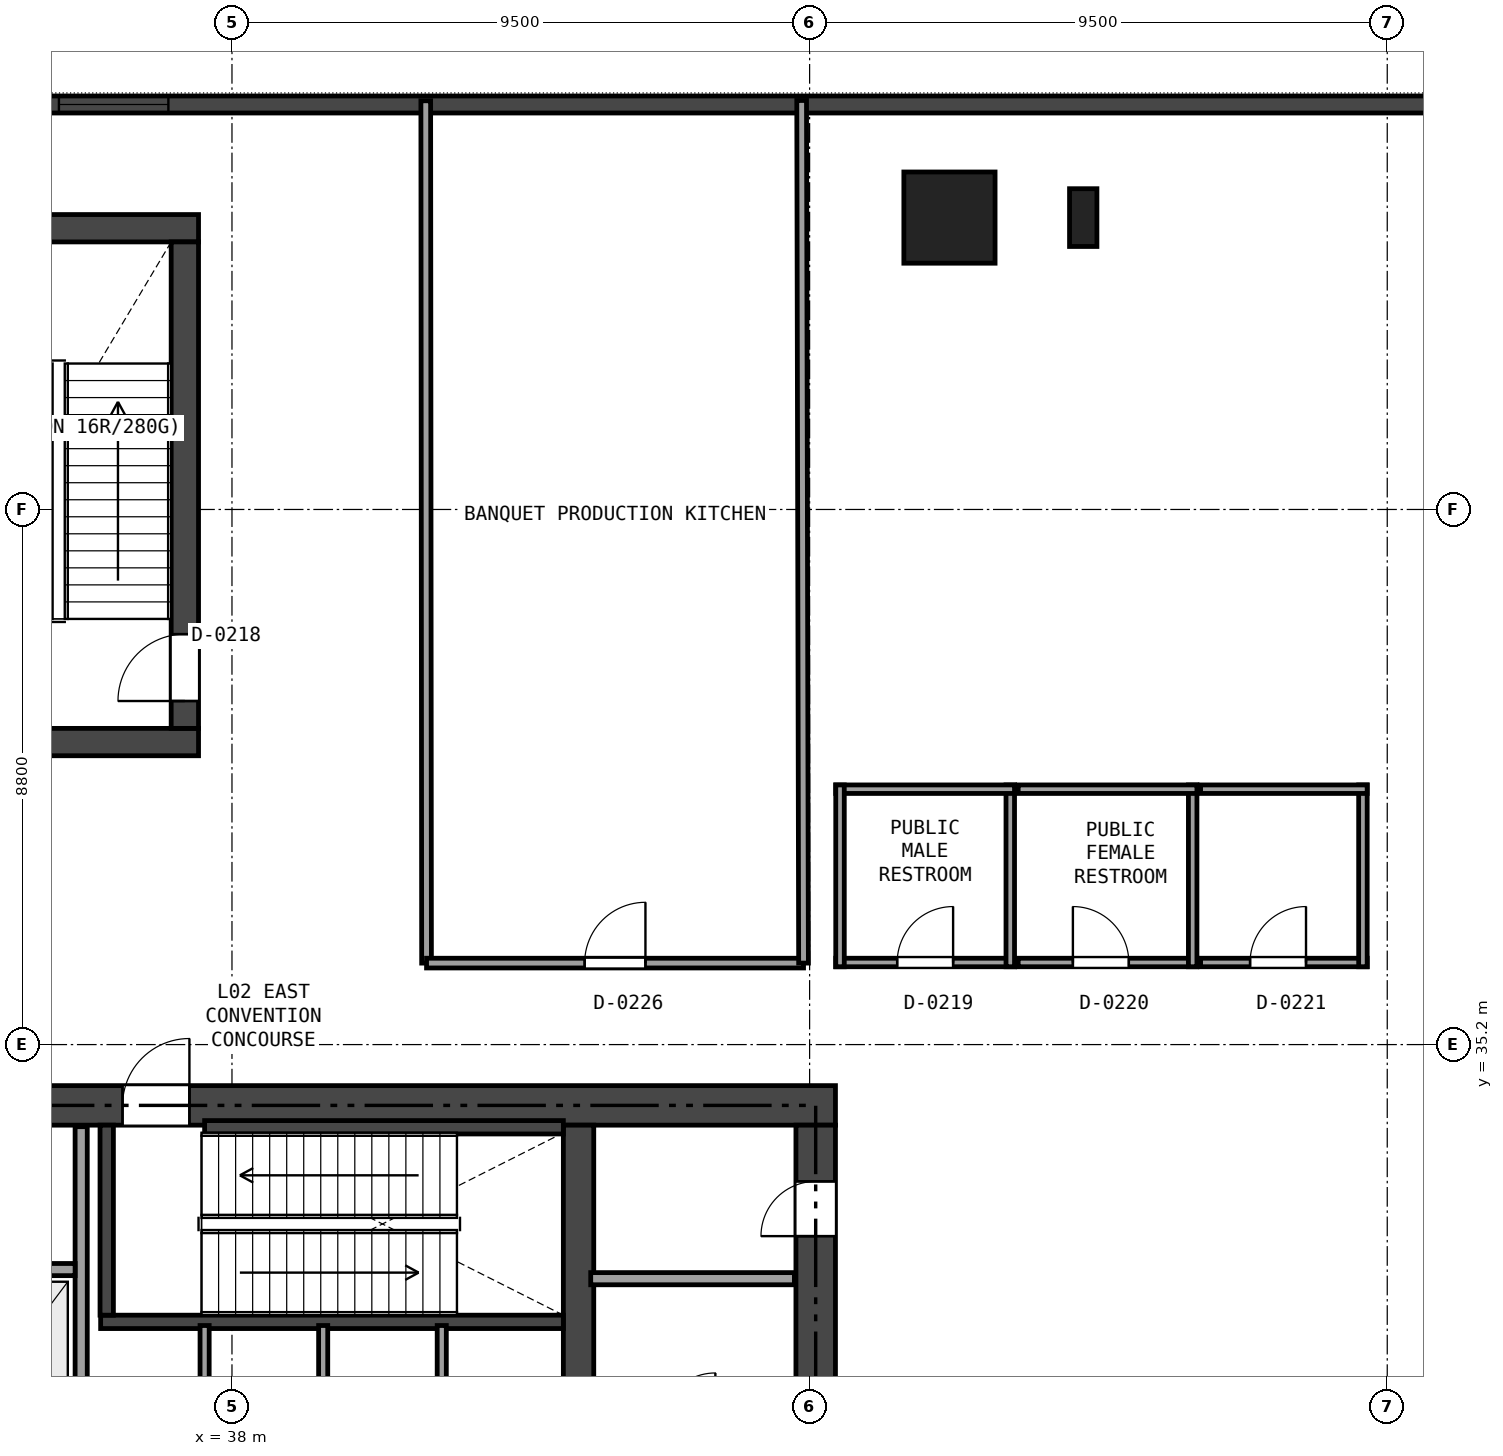
"""IFC4 building model, lengths in metres.
Left out: names, types, materials, properties, quantities, classifications, styles, units other than length and angle.
Written with IfcOpenShell. Run it as: python <this file> out.ifc"""

import sys

from ifc_helpers import new_model, si_unit, direction, frame, frame_2d, origin, origin_2d, place, context, subcontext, project, spatial, rectangle, extrude, element, fill, save


model = new_model("IFC4")
c1 = context("Model", 3, precision=1e-05, world=origin(), true_north=direction((0.0, 1.0)))
c2 = subcontext(c1, "Body", "Model", "MODEL_VIEW")
j1 = project(units=[si_unit("LENGTHUNIT", "METRE"), si_unit("PLANEANGLEUNIT", "RADIAN")], contexts=[c1])
p1 = place(None, origin())
s1 = spatial("IfcSite", under=j1, at=p1, CompositionType="ELEMENT")
p2 = place(p1, origin())
s2 = spatial("IfcBuilding", under=s1, at=p2, CompositionType="ELEMENT")
p3 = place(p2, frame((0.0, 0.0, 10.8)))
s3 = spatial("IfcBuildingStorey", under=s2, at=p3, CompositionType="ELEMENT", Elevation=10.8)
p4 = place(p3, frame((26.475, 34.2, 0.0), z_axis=(0.0, 0.0, 1.0), x_axis=(1.0, 0.0, 0.0)))
e1 = element("IfcWall", 1, at=p4, inside=s3, PredefinedType="SHEAR", context=c2, shape_type="SweptSolid", body=[
    extrude(rectangle(XDim=21.45, YDim=0.65, at=frame_2d((10.725, 0.0))), origin(), (0.0, 0.0, 1.0), 5.05),
])
p5 = place(p4, frame((9.725, 0.0, 0.0)))
e2 = element("IfcOpeningElement", 2, at=p5, cuts=e1, PredefinedType="OPENING", context=c2, shape_type="SweptSolid", body=[
    extrude(rectangle(XDim=1.1, YDim=2.15, at=frame_2d((0.55, 1.075))), frame((0.0, 0.335, 0.0), z_axis=(0.0, -1.0, 0.0), x_axis=(1.0, 0.0, 0.0)), (0.0, 0.0, 1.0), 0.67),
])
p6 = place(p4, frame((1.975, 0.0, 0.0)))
e3 = element("IfcOpeningElement", 3, at=p6, cuts=e1, PredefinedType="OPENING", context=c2, shape_type="SweptSolid", body=[
    extrude(rectangle(XDim=0.9, YDim=2.1, at=frame_2d((0.45, 1.05))), frame((0.0, 0.335, 0.0), z_axis=(0.0, -1.0, 0.0), x_axis=(1.0, 0.0, 0.0)), (0.0, 0.0, 1.0), 0.67),
])
p7 = place(p4, frame((6.275, 0.0, 0.0)))
e4 = element("IfcOpeningElement", 4, at=p7, cuts=e1, PredefinedType="OPENING", context=c2, shape_type="SweptSolid", body=[
    extrude(rectangle(XDim=0.9, YDim=2.1, at=frame_2d((0.45, 1.05))), frame((0.0, 0.335, 0.0), z_axis=(0.0, -1.0, 0.0), x_axis=(1.0, 0.0, 0.0)), (0.0, 0.0, 1.0), 0.67),
])
p8 = place(p3, frame((47.6, 18.925, 0.0), z_axis=(0.0, 0.0, 1.0), x_axis=(0.0, 1.0, 0.0)))
e5 = element("IfcWall", 5, at=p8, inside=s3, PredefinedType="SHEAR", context=c2, shape_type="SweptSolid", body=[
    extrude(rectangle(XDim=14.95, YDim=0.65, at=frame_2d((7.475, 0.0))), origin(), (0.0, 0.0, 1.0), 5.05),
])
p9 = place(p8, frame((6.575, 0.0, 0.0)))
e6 = element("IfcOpeningElement", 6, at=p9, cuts=e5, PredefinedType="OPENING", context=c2, shape_type="SweptSolid", body=[
    extrude(rectangle(XDim=1.1, YDim=2.15, at=frame_2d((0.55, 1.075))), frame((0.0, 0.335, 0.0), z_axis=(0.0, -1.0, 0.0), x_axis=(1.0, 0.0, 0.0)), (0.0, 0.0, 1.0), 0.67),
])
p10 = place(p8, frame((8.475, 0.0, 0.0)))
e7 = element("IfcOpeningElement", 7, at=p10, cuts=e5, PredefinedType="OPENING", context=c2, shape_type="SweptSolid", body=[
    extrude(rectangle(XDim=0.9, YDim=2.1, at=frame_2d((0.45, 1.05))), frame((0.0, 0.335, 0.0), z_axis=(0.0, -1.0, 0.0), x_axis=(1.0, 0.0, 0.0)), (0.0, 0.0, 1.0), 0.67),
])
p11 = place(p8, frame((13.125, 0.0, 0.0)))
e8 = element("IfcOpeningElement", 8, at=p11, cuts=e5, PredefinedType="OPENING", context=c2, shape_type="SweptSolid", body=[
    extrude(rectangle(XDim=0.9, YDim=2.1, at=frame_2d((0.45, 1.05))), frame((0.0, 0.335, 0.0), z_axis=(0.0, -1.0, 0.0), x_axis=(1.0, 0.0, 0.0)), (0.0, 0.0, 1.0), 0.67),
])
p12 = place(p3, frame((43.7, 18.925, 0.0), z_axis=(0.0, 0.0, 1.0), x_axis=(0.0, 1.0, 0.0)))
e9 = element("IfcWall", 9, at=p12, inside=s3, PredefinedType="SHEAR", context=c2, shape_type="SweptSolid", body=[
    extrude(rectangle(XDim=14.95, YDim=0.5, at=frame_2d((7.475, 0.0))), origin(), (0.0, 0.0, 1.0), 5.05),
])
p13 = place(p12, frame((8.075, 0.0, 0.0)))
e10 = element("IfcOpeningElement", 10, at=p13, cuts=e9, PredefinedType="OPENING", context=c2, shape_type="SweptSolid", body=[
    extrude(rectangle(XDim=0.9, YDim=2.1, at=frame_2d((0.45, 1.05))), frame((0.0, 0.26, 0.0), z_axis=(0.0, -1.0, 0.0), x_axis=(1.0, 0.0, 0.0)), (0.0, 0.0, 1.0), 0.52),
])
p14 = place(p3, frame((35.84, 30.64, 0.0), z_axis=(0.0, 0.0, 1.0), x_axis=(1.0, 0.0, 0.0)))
e11 = element("IfcWall", 11, at=p14, inside=s3, PredefinedType="SHEAR", context=c2, shape_type="SweptSolid", body=[
    extrude(rectangle(XDim=7.61, YDim=0.22, at=frame_2d((3.805, 0.0))), origin(), (0.0, 0.0, 1.0), 5.05),
])
p15 = place(p3, frame((35.94, 30.75, 0.0), z_axis=(0.0, 0.0, 1.0), x_axis=(0.0, 1.0, 0.0)))
e12 = element("IfcWall", 12, at=p15, inside=s3, PredefinedType="SHEAR", context=c2, shape_type="SweptSolid", body=[
    extrude(rectangle(XDim=3.125, YDim=0.22, at=frame_2d((1.562, 0.0))), origin(), (0.0, 0.0, 1.0), 5.05),
])
p16 = place(p3, frame((37.55, 33.84, 0.0), z_axis=(0.0, 0.0, 1.0), x_axis=(1.0, 0.0, 0.0)))
e13 = element("IfcWall", 13, at=p16, inside=s3, PredefinedType="SHEAR", context=c2, shape_type="SweptSolid", body=[
    extrude(rectangle(XDim=5.9, YDim=0.22, at=frame_2d((2.95, 0.0))), origin(), (0.0, 0.0, 1.0), 5.05),
])
for number, where, z_axis, x_axis in (
    (14, (32.85, 40.175, 0.0), (0.0, 0.0, 1.0), (1.0, 0.0, 0.0)),
    (15, (32.85, 48.625, 0.0), (0.0, 0.0, 1.0), (1.0, 0.0, 0.0)),
):
    element("IfcWall", number, at=place(p3, frame(where, z_axis=z_axis, x_axis=x_axis)), inside=s3, PredefinedType="SHEAR", context=c2, shape_type="SweptSolid", body=[
        extrude(rectangle(XDim=4.6, YDim=0.45, at=frame_2d((2.3, 0.0))), origin(), (0.0, 0.0, 1.0), 5.05),
    ])
p17 = place(p3, frame((37.225, 40.4, 0.0), z_axis=(0.0, 0.0, 1.0), x_axis=(0.0, 1.0, 0.0)))
e16 = element("IfcWall", 16, at=p17, inside=s3, PredefinedType="SHEAR", context=c2, shape_type="SweptSolid", body=[
    extrude(rectangle(XDim=8.0, YDim=0.45, at=frame_2d((4.0, 0.0))), origin(), (0.0, 0.0, 1.0), 5.05),
])
p18 = place(p17, frame((0.45, 0.0, 0.0)))
e17 = element("IfcOpeningElement", 17, at=p18, cuts=e16, PredefinedType="OPENING", context=c2, shape_type="SweptSolid", body=[
    extrude(rectangle(XDim=1.1, YDim=2.15, at=frame_2d((0.55, 1.075))), frame((0.0, 0.235, 0.0), z_axis=(0.0, -1.0, 0.0), x_axis=(1.0, 0.0, 0.0)), (0.0, 0.0, 1.0), 0.47),
])
p19 = place(p3, frame((49.8, 48.8, 0.0), z_axis=(0.0, 0.0, 1.0), x_axis=(1.0, 0.0, 0.0)))
e18 = element("IfcColumn", 18, at=p19, inside=s3, PredefinedType="COLUMN", context=c2, shape_type="SweptSolid", body=[
    extrude(rectangle(XDim=1.5, YDim=1.5, at=origin_2d()), origin(), (0.0, 0.0, 1.0), 5.05),
])
p20 = place(p3, frame((52.0, 48.8, 0.0), z_axis=(0.0, 0.0, 1.0), x_axis=(1.0, 0.0, 0.0)))
e19 = element("IfcColumn", 19, at=p20, inside=s3, PredefinedType="PILASTER", context=c2, shape_type="SweptSolid", body=[
    extrude(rectangle(XDim=0.45, YDim=0.95, at=origin_2d()), origin(), (0.0, 0.0, 1.0), 5.05),
])
p21 = place(p3, frame((3.74, 50.66, 0.0), z_axis=(0.0, 0.0, 1.0), x_axis=(1.0, 0.0, 0.0)))
e20 = element("IfcWall", 20, at=p21, inside=s3, PredefinedType="SOLIDWALL", context=c2, shape_type="SweptSolid", body=[
    extrude(rectangle(XDim=67.32, YDim=0.28, at=frame_2d((33.66, 0.0))), origin(), (0.0, 0.0, 1.0), 5.05),
])
p22 = place(p21, frame((13.91, 0.0, 0.95)))
e21 = element("IfcOpeningElement", 21, at=p22, cuts=e20, PredefinedType="OPENING", context=c2, shape_type="SweptSolid", body=[
    extrude(rectangle(XDim=1.8, YDim=2.3, at=frame_2d((0.9, 1.15))), frame((0.0, 0.15, 0.0), z_axis=(0.0, -1.0, 0.0), x_axis=(1.0, 0.0, 0.0)), (0.0, 0.0, 1.0), 0.3),
])
p23 = place(p21, frame((31.414, 0.0, 0.95)))
e22 = element("IfcOpeningElement", 22, at=p23, cuts=e20, PredefinedType="OPENING", context=c2, shape_type="SweptSolid", body=[
    extrude(rectangle(XDim=1.8, YDim=2.3, at=frame_2d((0.9, 1.15))), frame((0.0, 0.15, 0.0), z_axis=(0.0, -1.0, 0.0), x_axis=(1.0, 0.0, 0.0)), (0.0, 0.0, 1.0), 0.3),
])
p24 = place(p3, frame((43.9, 31.35, 0.0), z_axis=(0.0, 0.0, 1.0), x_axis=(1.0, 0.0, 0.0)))
e23 = element("IfcWall", 23, at=p24, inside=s3, PredefinedType="SOLIDWALL", context=c2, shape_type="SweptSolid", body=[
    extrude(rectangle(XDim=3.35, YDim=0.2, at=frame_2d((1.675, 0.0))), origin(), (0.0, 0.0, 1.0), 5.05),
])
p25 = place(p3, frame((35.52, 18.95, 0.0), z_axis=(0.0, 0.0, 1.0), x_axis=(0.0, 1.0, 0.0)))
e24 = element("IfcWall", 24, at=p25, inside=s3, PredefinedType="SOLIDWALL", context=c2, shape_type="SweptSolid", body=[
    extrude(rectangle(XDim=14.9, YDim=0.2, at=frame_2d((7.45, 0.0))), origin(), (0.0, 0.0, 1.0), 4.571),
])
p26 = place(p25, frame((7.755, 0.0, 0.0)))
e25 = element("IfcOpeningElement", 25, at=p26, cuts=e24, PredefinedType="OPENING", context=c2, shape_type="SweptSolid", body=[
    extrude(rectangle(XDim=0.95, YDim=2.15, at=frame_2d((0.475, 1.075))), frame((0.0, 0.11, 0.0), z_axis=(0.0, -1.0, 0.0), x_axis=(1.0, 0.0, 0.0)), (0.0, 0.0, 1.0), 0.22),
])
p27 = place(p25, frame((0.6, 0.0, 0.0)))
e26 = element("IfcOpeningElement", 26, at=p27, cuts=e24, PredefinedType="OPENING", context=c2, shape_type="SweptSolid", body=[
    extrude(rectangle(XDim=0.9, YDim=2.1, at=frame_2d((0.45, 1.05))), frame((0.0, 0.11, 0.0), z_axis=(0.0, -1.0, 0.0), x_axis=(1.0, 0.0, 0.0)), (0.0, 0.0, 1.0), 0.22),
])
p28 = place(p3, frame((31.0, 31.5, 0.0), z_axis=(0.0, 0.0, 1.0), x_axis=(1.0, 0.0, 0.0)))
e27 = element("IfcWall", 27, at=p28, inside=s3, PredefinedType="SOLIDWALL", context=c2, shape_type="SweptSolid", body=[
    extrude(rectangle(XDim=4.42, YDim=0.2, at=frame_2d((2.21, 0.0))), origin(), (0.0, 0.0, 1.0), 5.05),
])
for number, where, z_axis, x_axis in (
    (28, (37.55, 28.15, 0.0), (0.0, 0.0, 1.0), (0.0, 1.0, 0.0)),
    (29, (39.5, 28.15, 0.0), (0.0, 0.0, 1.0), (0.0, 1.0, 0.0)),
    (30, (41.45, 28.15, 0.0), (0.0, 0.0, 1.0), (0.0, 1.0, 0.0)),
):
    element("IfcWall", number, at=place(p3, frame(where, z_axis=z_axis, x_axis=x_axis)), inside=s3, PredefinedType="PARTITIONING", context=c2, shape_type="SweptSolid", body=[
        extrude(rectangle(XDim=2.43, YDim=0.15, at=frame_2d((1.215, 0.0))), origin(), (0.0, 0.0, 1.0), 5.05),
    ])
p29 = place(p3, frame((47.93, 36.55, 0.0), z_axis=(0.0, 0.0, 1.0), x_axis=(1.0, 0.0, 0.0)))
e31 = element("IfcWall", 31, at=p29, inside=s3, PredefinedType="PARTITIONING", context=c2, shape_type="SweptSolid", body=[
    extrude(rectangle(XDim=2.94, YDim=0.14, at=frame_2d((1.47, 0.0))), origin(), (0.0, 0.0, 1.0), 4.135),
])
p30 = place(p29, frame((1.01, 0.0, 0.0)))
e32 = element("IfcOpeningElement", 32, at=p30, cuts=e31, PredefinedType="OPENING", context=c2, shape_type="SweptSolid", body=[
    extrude(rectangle(XDim=0.92, YDim=2.1, at=frame_2d((0.46, 1.05))), frame((0.0, 0.08, 0.0), z_axis=(0.0, -1.0, 0.0), x_axis=(1.0, 0.0, 0.0)), (0.0, 0.0, 1.0), 0.16),
])
p31 = place(p3, frame((50.8, 36.48, 0.0), z_axis=(0.0, 0.0, 1.0), x_axis=(0.0, 1.0, 0.0)))
e33 = element("IfcWall", 33, at=p31, inside=s3, PredefinedType="PARTITIONING", context=c2, shape_type="SweptSolid", body=[
    extrude(rectangle(XDim=2.99, YDim=0.14, at=frame_2d((1.495, 0.0))), origin(), (0.0, 0.0, 1.0), 4.679),
])
p32 = place(p3, frame((50.87, 39.4, 0.0), z_axis=(0.0, 0.0, 1.0), x_axis=(-1.0, 0.0, 0.0)))
e34 = element("IfcWall", 34, at=p32, inside=s3, PredefinedType="PARTITIONING", context=c2, shape_type="SweptSolid", body=[
    extrude(rectangle(XDim=2.94, YDim=0.14, at=frame_2d((1.47, 0.0))), origin(), (0.0, 0.0, 1.0), 4.135),
])
p33 = place(p3, frame((48.0, 39.47, 0.0), z_axis=(0.0, 0.0, 1.0), x_axis=(0.0, -1.0, 0.0)))
e35 = element("IfcWall", 35, at=p33, inside=s3, PredefinedType="PARTITIONING", context=c2, shape_type="SweptSolid", body=[
    extrude(rectangle(XDim=2.99, YDim=0.14, at=frame_2d((1.495, 0.0))), origin(), (0.0, 0.0, 1.0), 4.135),
])
p34 = place(p3, frame((50.93, 36.55, 0.0), z_axis=(0.0, 0.0, 1.0), x_axis=(1.0, 0.0, 0.0)))
e36 = element("IfcWall", 36, at=p34, inside=s3, PredefinedType="PARTITIONING", context=c2, shape_type="SweptSolid", body=[
    extrude(rectangle(XDim=2.94, YDim=0.14, at=frame_2d((1.47, 0.0))), origin(), (0.0, 0.0, 1.0), 5.05),
])
p35 = place(p34, frame((0.9, 0.0, 0.0)))
e37 = element("IfcOpeningElement", 37, at=p35, cuts=e36, PredefinedType="OPENING", context=c2, shape_type="SweptSolid", body=[
    extrude(rectangle(XDim=0.92, YDim=2.1, at=frame_2d((0.46, 1.05))), frame((0.0, 0.08, 0.0), z_axis=(0.0, -1.0, 0.0), x_axis=(1.0, 0.0, 0.0)), (0.0, 0.0, 1.0), 0.16),
])
p36 = place(p3, frame((53.8, 36.48, 0.0), z_axis=(0.0, 0.0, 1.0), x_axis=(0.0, 1.0, 0.0)))
e38 = element("IfcWall", 38, at=p36, inside=s3, PredefinedType="PARTITIONING", context=c2, shape_type="SweptSolid", body=[
    extrude(rectangle(XDim=2.99, YDim=0.14, at=frame_2d((1.495, 0.0))), origin(), (0.0, 0.0, 1.0), 4.679),
])
p37 = place(p3, frame((53.87, 39.4, 0.0), z_axis=(0.0, 0.0, 1.0), x_axis=(-1.0, 0.0, 0.0)))
e39 = element("IfcWall", 39, at=p37, inside=s3, PredefinedType="PARTITIONING", context=c2, shape_type="SweptSolid", body=[
    extrude(rectangle(XDim=2.94, YDim=0.14, at=frame_2d((1.47, 0.0))), origin(), (0.0, 0.0, 1.0), 4.679),
])
p38 = place(p3, frame((53.93, 36.55, 0.0), z_axis=(0.0, 0.0, 1.0), x_axis=(1.0, 0.0, 0.0)))
e40 = element("IfcWall", 40, at=p38, inside=s3, PredefinedType="PARTITIONING", context=c2, shape_type="SweptSolid", body=[
    extrude(rectangle(XDim=2.74, YDim=0.14, at=frame_2d((1.37, 0.0))), origin(), (0.0, 0.0, 1.0), 5.05),
])
p39 = place(p38, frame((0.814, 0.0, 0.0)))
e41 = element("IfcOpeningElement", 41, at=p39, cuts=e40, PredefinedType="OPENING", context=c2, shape_type="SweptSolid", body=[
    extrude(rectangle(XDim=0.92, YDim=2.1, at=frame_2d((0.46, 1.05))), frame((0.0, 0.08, 0.0), z_axis=(0.0, -1.0, 0.0), x_axis=(1.0, 0.0, 0.0)), (0.0, 0.0, 1.0), 0.16),
])
p40 = place(p3, frame((56.6, 36.48, 0.0), z_axis=(0.0, 0.0, 1.0), x_axis=(0.0, 1.0, 0.0)))
e42 = element("IfcWall", 42, at=p40, inside=s3, PredefinedType="PARTITIONING", context=c2, shape_type="SweptSolid", body=[
    extrude(rectangle(XDim=2.99, YDim=0.14, at=frame_2d((1.495, 0.0))), origin(), (0.0, 0.0, 1.0), 4.679),
])
p41 = place(p3, frame((56.67, 39.4, 0.0), z_axis=(0.0, 0.0, 1.0), x_axis=(-1.0, 0.0, 0.0)))
e43 = element("IfcWall", 43, at=p41, inside=s3, PredefinedType="PARTITIONING", context=c2, shape_type="SweptSolid", body=[
    extrude(rectangle(XDim=2.74, YDim=0.14, at=frame_2d((1.37, 0.0))), origin(), (0.0, 0.0, 1.0), 4.679),
])
p42 = place(p3, frame((41.187, 50.721, 0.0), z_axis=(0.0, 0.0, 1.0), x_axis=(0.000912455504, -0.999999583712, 0.0)))
e44 = element("IfcWall", 44, at=p42, inside=s3, PredefinedType="PARTITIONING", context=c2, shape_type="SweptSolid", body=[
    extrude(rectangle(XDim=14.181, YDim=0.16, at=frame_2d((7.09, 0.0))), origin(), (0.0, 0.0, 1.0), 4.191),
])
p43 = place(p3, frame((41.2, 36.54, 0.0), z_axis=(0.0, 0.0, 1.0), x_axis=(1.0, 0.0, 0.0)))
e45 = element("IfcWall", 45, at=p43, inside=s3, PredefinedType="PARTITIONING", context=c2, shape_type="SweptSolid", body=[
    extrude(rectangle(XDim=6.2, YDim=0.16, at=frame_2d((3.1, 0.0))), origin(), (0.0, 0.0, 1.0), 5.05),
])
p44 = place(p43, frame((2.6, 0.0, 0.0)))
e46 = element("IfcOpeningElement", 46, at=p44, cuts=e45, PredefinedType="OPENING", context=c2, shape_type="SweptSolid", body=[
    extrude(rectangle(XDim=1.0, YDim=2.15, at=frame_2d((0.5, 1.075))), frame((0.0, 0.09, 0.0), z_axis=(0.0, -1.0, 0.0), x_axis=(1.0, 0.0, 0.0)), (0.0, 0.0, 1.0), 0.18),
])
p45 = place(p3, frame((47.4, 36.54, 0.0), z_axis=(0.0, 0.0, 1.0), x_axis=(-0.002185655469, 0.999997611452, 0.0)))
e47 = element("IfcWall", 47, at=p45, inside=s3, PredefinedType="PARTITIONING", context=c2, shape_type="SweptSolid", body=[
    extrude(rectangle(XDim=14.186, YDim=0.16, at=frame_2d((7.093, 0.0))), origin(), (0.0, 0.0, 1.0), 4.191),
])
p46 = place(p23, origin())
e48 = element("IfcWindow", 48, at=p46, inside=s3, PartitioningType="SINGLE_PANEL", PredefinedType="WINDOW", context=c2, shape_type="SweptSolid", body=[
    extrude(rectangle(XDim=1.8, YDim=2.3, at=frame_2d((0.9, 1.15))), frame((0.0, 0.03, 0.0), z_axis=(0.0, -1.0, 0.0), x_axis=(1.0, 0.0, 0.0)), (0.0, 0.0, 1.0), 0.06),
])
fill(e22, e48)
p47 = place(p5, origin())
e49 = element("IfcDoor", 49, at=p47, inside=s3, OperationType="SINGLE_SWING_RIGHT", PredefinedType="DOOR", context=c2, shape_type="SweptSolid", body=[
    extrude(rectangle(XDim=1.1, YDim=2.15, at=frame_2d((0.55, 1.075))), frame((0.0, 0.025, 0.0), z_axis=(0.0, -1.0, 0.0), x_axis=(1.0, 0.0, 0.0)), (0.0, 0.0, 1.0), 0.05),
])
fill(e2, e49)
p48 = place(p11, origin())
e50 = element("IfcDoor", 50, at=p48, inside=s3, OperationType="SINGLE_SWING_LEFT", PredefinedType="DOOR", context=c2, shape_type="SweptSolid", body=[
    extrude(rectangle(XDim=0.9, YDim=2.1, at=frame_2d((0.45, 1.05))), frame((0.0, 0.025, 0.0), z_axis=(0.0, -1.0, 0.0), x_axis=(1.0, 0.0, 0.0)), (0.0, 0.0, 1.0), 0.05),
])
fill(e8, e50)
p49 = place(p18, origin())
e51 = element("IfcDoor", 51, at=p49, inside=s3, OperationType="SINGLE_SWING_LEFT", PredefinedType="DOOR", context=c2, shape_type="SweptSolid", body=[
    extrude(rectangle(XDim=1.1, YDim=2.15, at=frame_2d((0.55, 1.075))), frame((0.0, 0.025, 0.0), z_axis=(0.0, -1.0, 0.0), x_axis=(1.0, 0.0, 0.0)), (0.0, 0.0, 1.0), 0.05),
])
fill(e17, e51)
p50 = place(p30, origin())
e52 = element("IfcDoor", 52, at=p50, inside=s3, OperationType="SINGLE_SWING_RIGHT", PredefinedType="DOOR", context=c2, shape_type="SweptSolid", body=[
    extrude(rectangle(XDim=0.92, YDim=2.1, at=frame_2d((0.46, 1.05))), frame((0.0, 0.025, 0.0), z_axis=(0.0, -1.0, 0.0), x_axis=(1.0, 0.0, 0.0)), (0.0, 0.0, 1.0), 0.05),
])
fill(e32, e52)
p51 = place(p35, origin())
e53 = element("IfcDoor", 53, at=p51, inside=s3, OperationType="SINGLE_SWING_LEFT", PredefinedType="DOOR", context=c2, shape_type="SweptSolid", body=[
    extrude(rectangle(XDim=0.92, YDim=2.1, at=frame_2d((0.46, 1.05))), frame((0.0, 0.025, 0.0), z_axis=(0.0, -1.0, 0.0), x_axis=(1.0, 0.0, 0.0)), (0.0, 0.0, 1.0), 0.05),
])
fill(e37, e53)
p52 = place(p39, origin())
e54 = element("IfcDoor", 54, at=p52, inside=s3, OperationType="SINGLE_SWING_RIGHT", PredefinedType="DOOR", context=c2, shape_type="SweptSolid", body=[
    extrude(rectangle(XDim=0.92, YDim=2.1, at=frame_2d((0.46, 1.05))), frame((0.0, 0.025, 0.0), z_axis=(0.0, -1.0, 0.0), x_axis=(1.0, 0.0, 0.0)), (0.0, 0.0, 1.0), 0.05),
])
fill(e41, e54)
p53 = place(p44, origin())
e55 = element("IfcDoor", 55, at=p53, inside=s3, OperationType="SINGLE_SWING_RIGHT", PredefinedType="DOOR", context=c2, shape_type="SweptSolid", body=[
    extrude(rectangle(XDim=1.0, YDim=2.15, at=frame_2d((0.5, 1.075))), frame((0.0, 0.025, 0.0), z_axis=(0.0, -1.0, 0.0), x_axis=(1.0, 0.0, 0.0)), (0.0, 0.0, 1.0), 0.05),
])
fill(e46, e55)
save(model, sys.argv[1])
